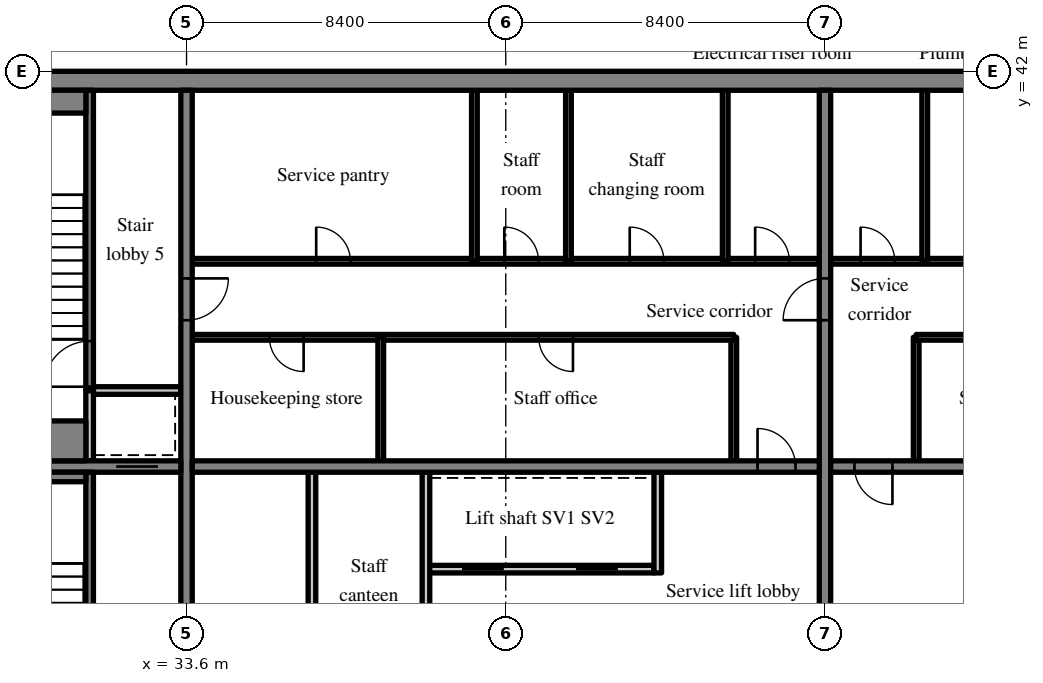
"""IFC4 building model, lengths in metres.
Left out: names, types, materials, properties, quantities, classifications, styles, units other than length and angle.
Written with IfcOpenShell. Run it as: python <this file> out.ifc"""

import sys

from ifc_helpers import new_model, si_unit, direction, frame, frame_2d, origin, place, context, subcontext, project, spatial, rectangle, extrude, source, transform, mapped, element, fill, save


model = new_model("IFC4")
c1 = context("Model", 3, precision=1e-05, world=origin(), true_north=direction((0.0, 1.0)))
c2 = subcontext(c1, "Body", "Model", "MODEL_VIEW")
j1 = project(units=[si_unit("LENGTHUNIT", "METRE"), si_unit("PLANEANGLEUNIT", "RADIAN")], contexts=[c1])
p1 = place(None, origin())
s1 = spatial("IfcSite", under=j1, at=p1, CompositionType="ELEMENT")
p2 = place(p1, origin())
s2 = spatial("IfcBuilding", under=s1, at=p2, CompositionType="ELEMENT")
p3 = place(p2, frame((0.0, 0.0, 297.7)))
s3 = spatial("IfcBuildingStorey", under=s2, at=p3, CompositionType="ELEMENT", Elevation=297.7)
m1 = source(origin(), c2, "Body", "SweptSolid", [
    extrude(rectangle(XDim=50.4, YDim=0.5, at=frame_2d((25.2, 0.0))), origin(), (0.0, 0.0, 1.0), 3.72),
])
p4 = place(p3, frame((25.2, 41.75, 0.0), z_axis=(0.0, 0.0, 1.0), x_axis=(1.0, 0.0, 0.0)))
e1 = element("IfcWall", 1, at=p4, inside=s3, PredefinedType="SHEAR", context=c2, shape_type="MappedRepresentation", body=[
    mapped(m1, transform((0.0, 0.0, 0.0), scale=1.0)),
])
m2 = source(origin(), c2, "Body", "SweptSolid", [
    extrude(rectangle(XDim=19.0, YDim=0.3, at=frame_2d((9.5, 0.0))), origin(), (0.0, 0.0, 1.0), 3.72),
])
p5 = place(p3, frame((33.6, 22.5, 0.0), z_axis=(0.0, 0.0, 1.0), x_axis=(0.0, 1.0, 0.0)))
e2 = element("IfcWall", 2, at=p5, inside=s3, PredefinedType="SHEAR", context=c2, shape_type="MappedRepresentation", body=[
    mapped(m2, transform((0.0, 0.0, 0.0), scale=1.0)),
])
m3 = source(origin(), c2, "Body", "SweptSolid", [
    extrude(rectangle(XDim=1.1, YDim=2.1, at=frame_2d((0.55, 1.05))), frame((0.0, 0.16, 0.0), z_axis=(0.0, -1.0, 0.0), x_axis=(1.0, 0.0, 0.0)), (0.0, 0.0, 1.0), 0.32),
])
p6 = place(p5, frame((12.95, 0.0, 0.0)))
e3 = element("IfcOpeningElement", 3, at=p6, cuts=e2, PredefinedType="OPENING", context=c2, shape_type="MappedRepresentation", body=[
    mapped(m3, transform((0.0, 0.0, 0.0), scale=1.0)),
])
p7 = place(p3, frame((50.4, 22.5, 0.0), z_axis=(0.0, 0.0, 1.0), x_axis=(0.0, 1.0, 0.0)))
e4 = element("IfcWall", 4, at=p7, inside=s3, PredefinedType="SHEAR", context=c2, shape_type="MappedRepresentation", body=[
    mapped(m2, transform((0.0, 0.0, 0.0), scale=1.0)),
])
p8 = place(p7, frame((12.95, 0.0, 0.0)))
e5 = element("IfcOpeningElement", 5, at=p8, cuts=e4, PredefinedType="OPENING", context=c2, shape_type="MappedRepresentation", body=[
    mapped(m3, transform((0.0, 0.0, 0.0), scale=1.0)),
])
m4 = source(origin(), c2, "Body", "SweptSolid", [
    extrude(rectangle(XDim=7.75, YDim=0.3, at=frame_2d((3.875, 0.0))), origin(), (0.0, 0.0, 1.0), 3.72),
])
p9 = place(p3, frame((25.7, 31.6, 0.0), z_axis=(0.0, 0.0, 1.0), x_axis=(1.0, 0.0, 0.0)))
e6 = element("IfcWall", 6, at=p9, inside=s3, PredefinedType="SHEAR", context=c2, shape_type="MappedRepresentation", body=[
    mapped(m4, transform((0.0, 0.0, 0.0), scale=1.0)),
])
p10 = place(p9, frame((6.05, 0.0, 0.0)))
e7 = element("IfcOpeningElement", 7, at=p10, cuts=e6, PredefinedType="OPENING", context=c2, shape_type="MappedRepresentation", body=[
    mapped(m3, transform((0.0, 0.0, 0.0), scale=1.0)),
])
m5 = source(origin(), c2, "Body", "SweptSolid", [
    extrude(rectangle(XDim=16.5, YDim=0.3, at=frame_2d((8.25, 0.0))), origin(), (0.0, 0.0, 1.0), 3.72),
])
p11 = place(p3, frame((33.75, 31.6, 0.0), z_axis=(0.0, 0.0, 1.0), x_axis=(1.0, 0.0, 0.0)))
e8 = element("IfcWall", 8, at=p11, inside=s3, PredefinedType="SHEAR", context=c2, shape_type="MappedRepresentation", body=[
    mapped(m5, transform((0.0, 0.0, 0.0), scale=1.0)),
])
m6 = source(origin(), c2, "Body", "SweptSolid", [
    extrude(rectangle(XDim=1.0, YDim=2.1, at=frame_2d((0.5, 1.05))), frame((0.0, 0.16, 0.0), z_axis=(0.0, -1.0, 0.0), x_axis=(1.0, 0.0, 0.0)), (0.0, 0.0, 1.0), 0.32),
])
p12 = place(p11, frame((14.875, 0.0, 0.0)))
e9 = element("IfcOpeningElement", 9, at=p12, cuts=e8, PredefinedType="OPENING", context=c2, shape_type="MappedRepresentation", body=[
    mapped(m6, transform((0.0, 0.0, 0.0), scale=1.0)),
])
p13 = place(p3, frame((50.55, 31.6, 0.0), z_axis=(0.0, 0.0, 1.0), x_axis=(1.0, 0.0, 0.0)))
e10 = element("IfcWall", 10, at=p13, inside=s3, PredefinedType="SHEAR", context=c2, shape_type="MappedRepresentation", body=[
    mapped(m5, transform((0.0, 0.0, 0.0), scale=1.0)),
])
p14 = place(p13, frame((0.625, 0.0, 0.0)))
e11 = element("IfcOpeningElement", 11, at=p14, cuts=e10, PredefinedType="OPENING", context=c2, shape_type="MappedRepresentation", body=[
    mapped(m6, transform((0.0, 0.0, 0.0), scale=1.0)),
])
m7 = source(origin(), c2, "Body", "SweptSolid", [
    extrude(rectangle(XDim=6.0, YDim=0.2, at=frame_2d((3.0, 0.0))), origin(), (0.0, 0.0, 1.0), 3.72),
])
p15 = place(p3, frame((39.9, 28.9, 0.0), z_axis=(0.0, 0.0, 1.0), x_axis=(1.0, 0.0, 0.0)))
e12 = element("IfcWall", 12, at=p15, inside=s3, PredefinedType="SOLIDWALL", context=c2, shape_type="MappedRepresentation", body=[
    mapped(m7, transform((0.0, 0.0, 0.0), scale=1.0)),
])
m8 = source(origin(), c2, "Body", "SweptSolid", [
    extrude(rectangle(XDim=1.1, YDim=2.1, at=frame_2d((0.55, 1.05))), frame((0.0, 0.11, 0.0), z_axis=(0.0, -1.0, 0.0), x_axis=(1.0, 0.0, 0.0)), (0.0, 0.0, 1.0), 0.22),
])
p16 = place(p15, frame((0.95, 0.0, 0.0)))
e13 = element("IfcOpeningElement", 13, at=p16, cuts=e12, PredefinedType="OPENING", context=c2, shape_type="MappedRepresentation", body=[
    mapped(m8, transform((0.0, 0.0, 0.0), scale=1.0)),
])
p17 = place(p15, frame((3.95, 0.0, 0.0)))
e14 = element("IfcOpeningElement", 14, at=p17, cuts=e12, PredefinedType="OPENING", context=c2, shape_type="MappedRepresentation", body=[
    mapped(m8, transform((0.0, 0.0, 0.0), scale=1.0)),
])
m9 = source(origin(), c2, "Body", "SweptSolid", [
    extrude(rectangle(XDim=8.95, YDim=0.2, at=frame_2d((4.475, 0.0))), origin(), (0.0, 0.0, 1.0), 3.72),
])
p18 = place(p3, frame((39.9, 22.5, 0.0), z_axis=(0.0, 0.0, 1.0), x_axis=(0.0, 1.0, 0.0)))
e15 = element("IfcWall", 15, at=p18, inside=s3, PredefinedType="PARTITIONING", context=c2, shape_type="MappedRepresentation", body=[
    mapped(m9, transform((0.0, 0.0, 0.0), scale=1.0)),
])
m10 = source(origin(), c2, "Body", "SweptSolid", [
    extrude(rectangle(XDim=0.9, YDim=2.1, at=frame_2d((0.45, 1.05))), frame((0.0, 0.11, 0.0), z_axis=(0.0, -1.0, 0.0), x_axis=(1.0, 0.0, 0.0)), (0.0, 0.0, 1.0), 0.22),
])
p19 = place(p18, frame((4.05, 0.0, 0.0)))
e16 = element("IfcOpeningElement", 16, at=p19, cuts=e15, PredefinedType="OPENING", context=c2, shape_type="MappedRepresentation", body=[
    mapped(m10, transform((0.0, 0.0, 0.0), scale=1.0)),
])
m11 = source(origin(), c2, "Body", "SweptSolid", [
    extrude(rectangle(XDim=2.65, YDim=0.2, at=frame_2d((1.325, 0.0))), origin(), (0.0, 0.0, 1.0), 3.72),
])
p20 = place(p3, frame((46.0, 28.8, 0.0), z_axis=(0.0, 0.0, 1.0), x_axis=(0.0, 1.0, 0.0)))
e17 = element("IfcWall", 17, at=p20, inside=s3, PredefinedType="SOLIDWALL", context=c2, shape_type="MappedRepresentation", body=[
    mapped(m11, transform((0.0, 0.0, 0.0), scale=1.0)),
])
p21 = place(p3, frame((36.9, 22.5, 0.0), z_axis=(0.0, 0.0, 1.0), x_axis=(0.0, 1.0, 0.0)))
e18 = element("IfcWall", 18, at=p21, inside=s3, PredefinedType="PARTITIONING", context=c2, shape_type="MappedRepresentation", body=[
    mapped(m9, transform((0.0, 0.0, 0.0), scale=1.0)),
])
m12 = source(origin(), c2, "Body", "SweptSolid", [
    extrude(rectangle(XDim=3.25, YDim=0.15, at=frame_2d((1.625, 0.0))), origin(), (0.0, 0.0, 1.0), 3.72),
])
p22 = place(p3, frame((48.0, 31.75, 0.0), z_axis=(0.0, 0.0, 1.0), x_axis=(0.0, 1.0, 0.0)))
e19 = element("IfcWall", 19, at=p22, inside=s3, PredefinedType="PARTITIONING", context=c2, shape_type="MappedRepresentation", body=[
    mapped(m12, transform((0.0, 0.0, 0.0), scale=1.0)),
])
m13 = source(origin(), c2, "Body", "SweptSolid", [
    extrude(rectangle(XDim=14.25, YDim=0.15, at=frame_2d((7.125, 0.0))), origin(), (0.0, 0.0, 1.0), 3.72),
])
p23 = place(p3, frame((33.75, 35.0, 0.0), z_axis=(0.0, 0.0, 1.0), x_axis=(1.0, 0.0, 0.0)))
e20 = element("IfcWall", 20, at=p23, inside=s3, PredefinedType="PARTITIONING", context=c2, shape_type="MappedRepresentation", body=[
    mapped(m13, transform((0.0, 0.0, 0.0), scale=1.0)),
])
m14 = source(origin(), c2, "Body", "SweptSolid", [
    extrude(rectangle(XDim=0.9, YDim=2.1, at=frame_2d((0.45, 1.05))), frame((0.0, 0.085, 0.0), z_axis=(0.0, -1.0, 0.0), x_axis=(1.0, 0.0, 0.0)), (0.0, 0.0, 1.0), 0.17),
])
p24 = place(p23, frame((2.031, 0.0, 0.0)))
e21 = element("IfcOpeningElement", 21, at=p24, cuts=e20, PredefinedType="OPENING", context=c2, shape_type="MappedRepresentation", body=[
    mapped(m14, transform((0.0, 0.0, 0.0), scale=1.0)),
])
p25 = place(p23, frame((9.118, 0.0, 0.0)))
e22 = element("IfcOpeningElement", 22, at=p25, cuts=e20, PredefinedType="OPENING", context=c2, shape_type="MappedRepresentation", body=[
    mapped(m14, transform((0.0, 0.0, 0.0), scale=1.0)),
])
m15 = source(origin(), c2, "Body", "SweptSolid", [
    extrude(rectangle(XDim=16.5, YDim=0.15, at=frame_2d((8.25, 0.0))), origin(), (0.0, 0.0, 1.0), 3.72),
])
p26 = place(p3, frame((33.75, 37.0, 0.0), z_axis=(0.0, 0.0, 1.0), x_axis=(1.0, 0.0, 0.0)))
e23 = element("IfcWall", 23, at=p26, inside=s3, PredefinedType="PARTITIONING", context=c2, shape_type="MappedRepresentation", body=[
    mapped(m15, transform((0.0, 0.0, 0.0), scale=1.0)),
])
p27 = place(p26, frame((3.262, 0.0, 0.0)))
e24 = element("IfcOpeningElement", 24, at=p27, cuts=e23, PredefinedType="OPENING", context=c2, shape_type="MappedRepresentation", body=[
    mapped(m14, transform((0.0, 0.0, 0.0), scale=1.0)),
])
p28 = place(p26, frame((8.212, 0.0, 0.0)))
e25 = element("IfcOpeningElement", 25, at=p28, cuts=e23, PredefinedType="OPENING", context=c2, shape_type="MappedRepresentation", body=[
    mapped(m14, transform((0.0, 0.0, 0.0), scale=1.0)),
])
p29 = place(p26, frame((11.512, 0.0, 0.0)))
e26 = element("IfcOpeningElement", 26, at=p29, cuts=e23, PredefinedType="OPENING", context=c2, shape_type="MappedRepresentation", body=[
    mapped(m14, transform((0.0, 0.0, 0.0), scale=1.0)),
])
p30 = place(p26, frame((14.813, 0.0, 0.0)))
e27 = element("IfcOpeningElement", 27, at=p30, cuts=e23, PredefinedType="OPENING", context=c2, shape_type="MappedRepresentation", body=[
    mapped(m14, transform((0.0, 0.0, 0.0), scale=1.0)),
])
p31 = place(p3, frame((38.711, 31.75, 0.0), z_axis=(0.0, 0.0, 1.0), x_axis=(0.0, 1.0, 0.0)))
e28 = element("IfcWall", 28, at=p31, inside=s3, PredefinedType="PARTITIONING", context=c2, shape_type="MappedRepresentation", body=[
    mapped(m12, transform((0.0, 0.0, 0.0), scale=1.0)),
])
m16 = source(origin(), c2, "Body", "SweptSolid", [
    extrude(rectangle(XDim=4.5, YDim=0.15, at=frame_2d((2.25, 0.0))), origin(), (0.0, 0.0, 1.0), 3.72),
])
for number, where, z_axis, x_axis in (
    (29, (41.175, 37.0, 0.0), (0.0, 0.0, 1.0), (0.0, 1.0, 0.0)),
    (30, (43.65, 37.0, 0.0), (0.0, 0.0, 1.0), (0.0, 1.0, 0.0)),
    (31, (47.775, 37.0, 0.0), (0.0, 0.0, 1.0), (0.0, 1.0, 0.0)),
):
    element("IfcWall", number, at=place(p3, frame(where, z_axis=z_axis, x_axis=x_axis)), inside=s3, PredefinedType="PARTITIONING", context=c2, shape_type="MappedRepresentation", body=[
        mapped(m16, transform((0.0, 0.0, 0.0), scale=1.0)),
    ])
p32 = place(p3, frame((52.8, 31.75, 0.0), z_axis=(0.0, 0.0, 1.0), x_axis=(0.0, 1.0, 0.0)))
e32 = element("IfcWall", 32, at=p32, inside=s3, PredefinedType="PARTITIONING", context=c2, shape_type="MappedRepresentation", body=[
    mapped(m12, transform((0.0, 0.0, 0.0), scale=1.0)),
])
p33 = place(p3, frame((67.05, 35.0, 0.0), z_axis=(0.0, 0.0, 1.0), x_axis=(-1.0, 0.0, 0.0)))
e33 = element("IfcWall", 33, at=p33, inside=s3, PredefinedType="PARTITIONING", context=c2, shape_type="MappedRepresentation", body=[
    mapped(m13, transform((0.0, 0.0, 0.0), scale=1.0)),
])
p34 = place(p33, frame((0.968, 0.0, 0.0)))
e34 = element("IfcOpeningElement", 34, at=p34, cuts=e33, PredefinedType="OPENING", context=c2, shape_type="MappedRepresentation", body=[
    mapped(m14, transform((0.0, 0.0, 0.0), scale=1.0)),
])
p35 = place(p33, frame((5.929, 0.0, 0.0)))
e35 = element("IfcOpeningElement", 35, at=p35, cuts=e33, PredefinedType="OPENING", context=c2, shape_type="MappedRepresentation", body=[
    mapped(m14, transform((0.0, 0.0, 0.0), scale=1.0)),
])
p36 = place(p33, frame((11.599, 0.0, 0.0)))
e36 = element("IfcOpeningElement", 36, at=p36, cuts=e33, PredefinedType="OPENING", context=c2, shape_type="MappedRepresentation", body=[
    mapped(m14, transform((0.0, 0.0, 0.0), scale=1.0)),
])
p37 = place(p3, frame((67.05, 37.0, 0.0), z_axis=(0.0, 0.0, 1.0), x_axis=(-1.0, 0.0, 0.0)))
e37 = element("IfcWall", 37, at=p37, inside=s3, PredefinedType="PARTITIONING", context=c2, shape_type="MappedRepresentation", body=[
    mapped(m15, transform((0.0, 0.0, 0.0), scale=1.0)),
])
p38 = place(p37, frame((0.788, 0.0, 0.0)))
e38 = element("IfcOpeningElement", 38, at=p38, cuts=e37, PredefinedType="OPENING", context=c2, shape_type="MappedRepresentation", body=[
    mapped(m14, transform((0.0, 0.0, 0.0), scale=1.0)),
])
p39 = place(p37, frame((3.675, 0.0, 0.0)))
e39 = element("IfcOpeningElement", 39, at=p39, cuts=e37, PredefinedType="OPENING", context=c2, shape_type="MappedRepresentation", body=[
    mapped(m14, transform((0.0, 0.0, 0.0), scale=1.0)),
])
p40 = place(p37, frame((9.45, 0.0, 0.0)))
e40 = element("IfcOpeningElement", 40, at=p40, cuts=e37, PredefinedType="OPENING", context=c2, shape_type="MappedRepresentation", body=[
    mapped(m14, transform((0.0, 0.0, 0.0), scale=1.0)),
])
p41 = place(p37, frame((14.813, 0.0, 0.0)))
e41 = element("IfcOpeningElement", 41, at=p41, cuts=e37, PredefinedType="OPENING", context=c2, shape_type="MappedRepresentation", body=[
    mapped(m14, transform((0.0, 0.0, 0.0), scale=1.0)),
])
p42 = place(p3, frame((53.025, 37.0, 0.0), z_axis=(0.0, 0.0, 1.0), x_axis=(0.0, 1.0, 0.0)))
e42 = element("IfcWall", 42, at=p42, inside=s3, PredefinedType="PARTITIONING", context=c2, shape_type="MappedRepresentation", body=[
    mapped(m16, transform((0.0, 0.0, 0.0), scale=1.0)),
])
m17 = source(origin(), c2, "Body", "SweptSolid", [
    extrude(rectangle(XDim=8.95, YDim=0.2, at=frame_2d((4.475, 0.0))), origin(), (0.0, 0.0, 1.0), 3.72),
])
p43 = place(p3, frame((31.05, 22.5, 0.0), z_axis=(0.0, 0.0, 1.0), x_axis=(0.0, 1.0, 0.0)))
e43 = element("IfcWall", 43, at=p43, inside=s3, PredefinedType="SOLIDWALL", context=c2, shape_type="MappedRepresentation", body=[
    mapped(m17, transform((0.0, 0.0, 0.0), scale=1.0)),
])
m18 = source(origin(), c2, "Body", "SweptSolid", [
    extrude(rectangle(XDim=1.2, YDim=2.1, at=frame_2d((0.6, 1.05))), frame((0.0, 0.11, 0.0), z_axis=(0.0, -1.0, 0.0), x_axis=(1.0, 0.0, 0.0)), (0.0, 0.0, 1.0), 0.22),
])
p44 = place(p43, frame((1.1, 0.0, 0.0)))
e44 = element("IfcOpeningElement", 44, at=p44, cuts=e43, PredefinedType="OPENING", context=c2, shape_type="MappedRepresentation", body=[
    mapped(m18, transform((0.0, 0.0, 0.0), scale=1.0)),
])
m19 = source(origin(), c2, "Body", "SweptSolid", [
    extrude(rectangle(XDim=1.85, YDim=0.2, at=frame_2d((0.925, 0.0))), origin(), (0.0, 0.0, 1.0), 3.72),
])
p45 = place(p3, frame((31.05, 31.75, 0.0), z_axis=(0.0, 0.0, 1.0), x_axis=(0.0, 1.0, 0.0)))
e45 = element("IfcWall", 45, at=p45, inside=s3, PredefinedType="SOLIDWALL", context=c2, shape_type="MappedRepresentation", body=[
    mapped(m19, transform((0.0, 0.0, 0.0), scale=1.0)),
])
m20 = source(origin(), c2, "Body", "SweptSolid", [
    extrude(rectangle(XDim=2.3, YDim=0.2, at=frame_2d((1.15, 0.0))), origin(), (0.0, 0.0, 1.0), 3.72),
])
p46 = place(p3, frame((31.15, 33.6, 0.0), z_axis=(0.0, 0.0, 1.0), x_axis=(1.0, 0.0, 0.0)))
e46 = element("IfcWall", 46, at=p46, inside=s3, PredefinedType="SOLIDWALL", context=c2, shape_type="MappedRepresentation", body=[
    mapped(m20, transform((0.0, 0.0, 0.0), scale=1.0)),
])
m21 = source(origin(), c2, "Body", "SweptSolid", [
    extrude(rectangle(XDim=7.9, YDim=0.2, at=frame_2d((3.95, 0.0))), origin(), (0.0, 0.0, 1.0), 3.72),
])
p47 = place(p3, frame((31.05, 33.6, 0.0), z_axis=(0.0, 0.0, 1.0), x_axis=(0.0, 1.0, 0.0)))
e47 = element("IfcWall", 47, at=p47, inside=s3, PredefinedType="SOLIDWALL", context=c2, shape_type="MappedRepresentation", body=[
    mapped(m21, transform((0.0, 0.0, 0.0), scale=1.0)),
])
p48 = place(p47, frame((0.1, 0.0, 0.0)))
e48 = element("IfcOpeningElement", 48, at=p48, cuts=e47, PredefinedType="OPENING", context=c2, shape_type="MappedRepresentation", body=[
    mapped(m18, transform((0.0, 0.0, 0.0), scale=1.0)),
])
m22 = source(origin(), c2, "Body", "SweptSolid", [
    extrude(rectangle(XDim=5.25, YDim=0.25, at=frame_2d((2.625, 0.0))), origin(), (0.0, 0.0, 1.0), 3.72),
])
p49 = place(p3, frame((25.7, 31.325, 0.0), z_axis=(0.0, 0.0, 1.0), x_axis=(1.0, 0.0, 0.0)))
e49 = element("IfcWall", 49, at=p49, inside=s3, PredefinedType="SOLIDWALL", context=c2, shape_type="MappedRepresentation", body=[
    mapped(m22, transform((0.0, 0.0, 0.0), scale=1.0)),
])
m23 = source(origin(), c2, "Body", "SweptSolid", [
    extrude(rectangle(XDim=5.25, YDim=0.6, at=frame_2d((2.625, 0.0))), origin(), (0.0, 0.0, 1.0), 3.72),
])
p50 = place(p3, frame((25.7, 41.2, 0.0), z_axis=(0.0, 0.0, 1.0), x_axis=(1.0, 0.0, 0.0)))
e50 = element("IfcWall", 50, at=p50, inside=s3, PredefinedType="SOLIDWALL", context=c2, shape_type="MappedRepresentation", body=[
    mapped(m23, transform((0.0, 0.0, 0.0), scale=1.0)),
])
m24 = source(origin(), c2, "Body", "SweptSolid", [
    extrude(rectangle(XDim=5.25, YDim=1.05, at=frame_2d((2.625, 0.0))), origin(), (0.0, 0.0, 1.0), 3.72),
])
p51 = place(p3, frame((25.7, 32.275, 0.0), z_axis=(0.0, 0.0, 1.0), x_axis=(1.0, 0.0, 0.0)))
e51 = element("IfcWall", 51, at=p51, inside=s3, PredefinedType="SOLIDWALL", context=c2, shape_type="MappedRepresentation", body=[
    mapped(m24, transform((0.0, 0.0, 0.0), scale=1.0)),
])
m25 = source(origin(), c2, "Body", "SweptSolid", [
    extrude(rectangle(XDim=1.0, YDim=2.1, at=frame_2d((0.5, 1.05))), frame((0.0, 0.025, 0.0), z_axis=(0.0, -1.0, 0.0), x_axis=(1.0, 0.0, 0.0)), (0.0, 0.0, 1.0), 0.05),
])
p52 = place(p12, origin())
e52 = element("IfcDoor", 52, at=p52, inside=s3, OperationType="SINGLE_SWING_LEFT", PredefinedType="DOOR", context=c2, shape_type="MappedRepresentation", body=[
    mapped(m25, transform((0.0, 0.0, 0.0), scale=1.0)),
])
fill(e9, e52)
m26 = source(origin(), c2, "Body", "SweptSolid", [
    extrude(rectangle(XDim=1.1, YDim=2.1, at=frame_2d((0.55, 1.05))), frame((0.0, 0.025, 0.0), z_axis=(0.0, -1.0, 0.0), x_axis=(1.0, 0.0, 0.0)), (0.0, 0.0, 1.0), 0.05),
])
p53 = place(p16, origin())
e53 = element("IfcDoor", 53, at=p53, inside=s3, OperationType="SLIDING_TO_LEFT", PredefinedType="DOOR", context=c2, shape_type="MappedRepresentation", body=[
    mapped(m26, transform((0.0, 0.0, 0.0), scale=1.0)),
])
fill(e13, e53)
p54 = place(p17, origin())
e54 = element("IfcDoor", 54, at=p54, inside=s3, OperationType="SLIDING_TO_RIGHT", PredefinedType="DOOR", context=c2, shape_type="MappedRepresentation", body=[
    mapped(m26, transform((0.0, 0.0, 0.0), scale=1.0)),
])
fill(e14, e54)
m27 = source(origin(), c2, "Body", "SweptSolid", [
    extrude(rectangle(XDim=0.9, YDim=2.1, at=frame_2d((0.45, 1.05))), frame((0.0, 0.025, 0.0), z_axis=(0.0, -1.0, 0.0), x_axis=(1.0, 0.0, 0.0)), (0.0, 0.0, 1.0), 0.05),
])
p55 = place(p24, origin())
e55 = element("IfcDoor", 55, at=p55, inside=s3, OperationType="SINGLE_SWING_RIGHT", PredefinedType="DOOR", context=c2, shape_type="MappedRepresentation", body=[
    mapped(m27, transform((0.0, 0.0, 0.0), scale=1.0)),
])
fill(e21, e55)
p56 = place(p25, origin())
e56 = element("IfcDoor", 56, at=p56, inside=s3, OperationType="SINGLE_SWING_RIGHT", PredefinedType="DOOR", context=c2, shape_type="MappedRepresentation", body=[
    mapped(m27, transform((0.0, 0.0, 0.0), scale=1.0)),
])
fill(e22, e56)
p57 = place(p27, origin())
e57 = element("IfcDoor", 57, at=p57, inside=s3, OperationType="SINGLE_SWING_LEFT", PredefinedType="DOOR", context=c2, shape_type="MappedRepresentation", body=[
    mapped(m27, transform((0.0, 0.0, 0.0), scale=1.0)),
])
fill(e24, e57)
p58 = place(p28, origin())
e58 = element("IfcDoor", 58, at=p58, inside=s3, OperationType="SINGLE_SWING_LEFT", PredefinedType="DOOR", context=c2, shape_type="MappedRepresentation", body=[
    mapped(m27, transform((0.0, 0.0, 0.0), scale=1.0)),
])
fill(e25, e58)
p59 = place(p29, origin())
e59 = element("IfcDoor", 59, at=p59, inside=s3, OperationType="SINGLE_SWING_LEFT", PredefinedType="DOOR", context=c2, shape_type="MappedRepresentation", body=[
    mapped(m27, transform((0.0, 0.0, 0.0), scale=1.0)),
])
fill(e26, e59)
p60 = place(p30, origin())
e60 = element("IfcDoor", 60, at=p60, inside=s3, OperationType="SINGLE_SWING_LEFT", PredefinedType="DOOR", context=c2, shape_type="MappedRepresentation", body=[
    mapped(m27, transform((0.0, 0.0, 0.0), scale=1.0)),
])
fill(e27, e60)
p61 = place(p14, origin())
e61 = element("IfcDoor", 61, at=p61, inside=s3, OperationType="SINGLE_SWING_RIGHT", PredefinedType="DOOR", context=c2, shape_type="MappedRepresentation", body=[
    mapped(m25, transform((0.0, 0.0, 0.0), scale=1.0)),
])
fill(e11, e61)
p62 = place(p41, origin())
e62 = element("IfcDoor", 62, at=p62, inside=s3, OperationType="SINGLE_SWING_RIGHT", PredefinedType="DOOR", context=c2, shape_type="MappedRepresentation", body=[
    mapped(m27, transform((0.0, 0.0, 0.0), scale=1.0)),
])
fill(e41, e62)
p63 = place(p10, origin())
e63 = element("IfcDoor", 63, at=p63, inside=s3, OperationType="SLIDING_TO_LEFT", PredefinedType="DOOR", context=c2, shape_type="MappedRepresentation", body=[
    mapped(m26, transform((0.0, 0.0, 0.0), scale=1.0)),
])
fill(e7, e63)
m28 = source(origin(), c2, "Body", "SweptSolid", [
    extrude(rectangle(XDim=1.2, YDim=2.1, at=frame_2d((0.6, 1.05))), frame((0.0, 0.025, 0.0), z_axis=(0.0, -1.0, 0.0), x_axis=(1.0, 0.0, 0.0)), (0.0, 0.0, 1.0), 0.05),
])
p64 = place(p48, origin())
e64 = element("IfcDoor", 64, at=p64, inside=s3, OperationType="SINGLE_SWING_LEFT", PredefinedType="DOOR", context=c2, shape_type="MappedRepresentation", body=[
    mapped(m28, transform((0.0, 0.0, 0.0), scale=1.0)),
])
fill(e48, e64)
p65 = place(p6, origin())
e65 = element("IfcDoor", 65, at=p65, inside=s3, OperationType="SINGLE_SWING_RIGHT", PredefinedType="DOOR", context=c2, shape_type="MappedRepresentation", body=[
    mapped(m26, transform((0.0, 0.0, 0.0), scale=1.0)),
])
fill(e3, e65)
p66 = place(p8, origin())
e66 = element("IfcDoor", 66, at=p66, inside=s3, OperationType="SINGLE_SWING_LEFT", PredefinedType="DOOR", context=c2, shape_type="MappedRepresentation", body=[
    mapped(m26, transform((0.0, 0.0, 0.0), scale=1.0)),
])
fill(e5, e66)
save(model, sys.argv[1])
